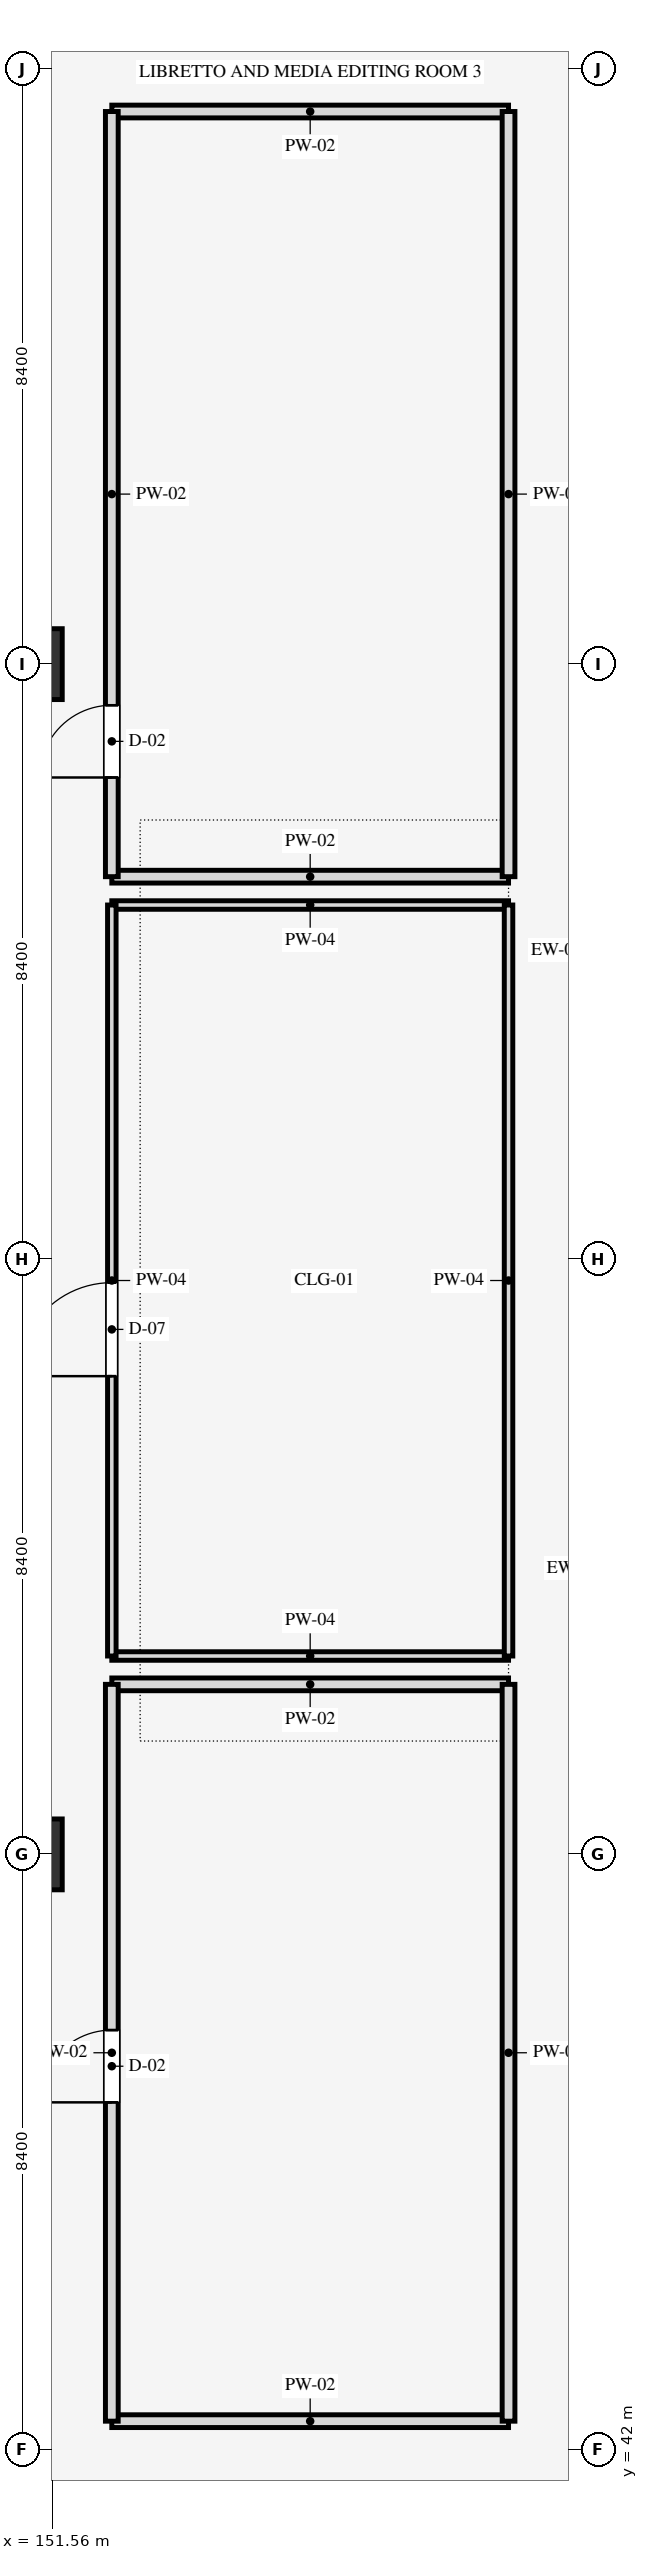
"""IFC4 building model, lengths in metres.
Left out: names, types, materials, properties, quantities, classifications, styles, units other than length and angle.
Written with IfcOpenShell. Run it as: python <this file> out.ifc"""

import sys

from ifc_helpers import new_model, si_unit, direction, frame, frame_2d, origin, origin_2d, place, context, subcontext, project, spatial, rectangle, extrude, element, fill, save


model = new_model("IFC4")
c1 = context("Model", 3, precision=1e-05, world=origin(), true_north=direction((0.0, 1.0)))
c2 = subcontext(c1, "Body", "Model", "MODEL_VIEW")
j1 = project(units=[si_unit("LENGTHUNIT", "METRE"), si_unit("PLANEANGLEUNIT", "RADIAN")], contexts=[c1])
p1 = place(None, origin())
s1 = spatial("IfcSite", under=j1, at=p1, CompositionType="ELEMENT")
p2 = place(p1, origin())
s2 = spatial("IfcBuilding", under=s1, at=p2, CompositionType="ELEMENT")
p3 = place(p2, frame((0.0, 0.0, 44.7)))
s3 = spatial("IfcBuildingStorey", under=s2, at=p3, CompositionType="ELEMENT", Elevation=44.7)
for number, where, z_axis, x_axis in (
    (1, (151.2, 50.4, 0.0), (0.0, 0.0, 1.0), (1.0, 0.0, 0.0)),
    (2, (151.2, 67.2, 0.0), (0.0, 0.0, 1.0), (1.0, 0.0, 0.0)),
):
    element("IfcColumn", number, at=place(p3, frame(where, z_axis=z_axis, x_axis=x_axis)), inside=s3, PredefinedType="COLUMN", context=c2, shape_type="SweptSolid", body=[
        extrude(rectangle(XDim=1.0, YDim=1.0, at=origin_2d()), origin(), (0.0, 0.0, 1.0), 4.2),
    ])
for number, where, z_axis, x_axis in (
    (3, (152.4, 42.4, 0.0), (0.0, 0.0, 1.0), (1.0, 0.0, 0.0)),
    (4, (152.4, 52.8, 0.0), (0.0, 0.0, 1.0), (1.0, 0.0, 0.0)),
):
    element("IfcWall", number, at=place(p3, frame(where, z_axis=z_axis, x_axis=x_axis)), inside=s3, PredefinedType="PARTITIONING", context=c2, shape_type="SweptSolid", body=[
        extrude(rectangle(XDim=5.6, YDim=0.18, at=frame_2d((2.8, 0.0))), origin(), (0.0, 0.0, 1.0), 3.24),
    ])
p4 = place(p3, frame((152.4, 42.4, 0.0), z_axis=(0.0, 0.0, 1.0), x_axis=(0.0, 1.0, 0.0)))
e5 = element("IfcWall", 5, at=p4, inside=s3, PredefinedType="PARTITIONING", context=c2, shape_type="SweptSolid", body=[
    extrude(rectangle(XDim=10.4, YDim=0.18, at=frame_2d((5.2, 0.0))), origin(), (0.0, 0.0, 1.0), 3.24),
])
p5 = place(p4, frame((4.5, 0.0, 0.0)))
e6 = element("IfcOpeningElement", 6, at=p5, cuts=e5, PredefinedType="OPENING", context=c2, shape_type="SweptSolid", body=[
    extrude(rectangle(XDim=1.02, YDim=2.1, at=frame_2d((0.51, 1.05))), frame((0.0, 0.1, 0.0), z_axis=(0.0, -1.0, 0.0), x_axis=(1.0, 0.0, 0.0)), (0.0, 0.0, 1.0), 0.2),
])
p6 = place(p3, frame((158.0, 42.4, 0.0), z_axis=(0.0, 0.0, 1.0), x_axis=(0.0, 1.0, 0.0)))
e7 = element("IfcWall", 7, at=p6, inside=s3, PredefinedType="PARTITIONING", context=c2, shape_type="SweptSolid", body=[
    extrude(rectangle(XDim=10.4, YDim=0.18, at=frame_2d((5.2, 0.0))), origin(), (0.0, 0.0, 1.0), 3.24),
])
for number, where, z_axis, x_axis in (
    (8, (152.4, 53.2, 0.0), (0.0, 0.0, 1.0), (1.0, 0.0, 0.0)),
    (9, (152.4, 63.8, 0.0), (0.0, 0.0, 1.0), (1.0, 0.0, 0.0)),
):
    element("IfcWall", number, at=place(p3, frame(where, z_axis=z_axis, x_axis=x_axis)), inside=s3, PredefinedType="PARTITIONING", context=c2, shape_type="SweptSolid", body=[
        extrude(rectangle(XDim=5.6, YDim=0.12, at=frame_2d((2.8, 0.0))), origin(), (0.0, 0.0, 1.0), 3.24),
    ])
p7 = place(p3, frame((152.4, 53.2, 0.0), z_axis=(0.0, 0.0, 1.0), x_axis=(0.0, 1.0, 0.0)))
e10 = element("IfcWall", 10, at=p7, inside=s3, PredefinedType="PARTITIONING", context=c2, shape_type="SweptSolid", body=[
    extrude(rectangle(XDim=10.6, YDim=0.12, at=frame_2d((5.3, 0.0))), origin(), (0.0, 0.0, 1.0), 3.24),
])
p8 = place(p7, frame((3.95, 0.0, 0.0)))
e11 = element("IfcOpeningElement", 11, at=p8, cuts=e10, PredefinedType="OPENING", context=c2, shape_type="SweptSolid", body=[
    extrude(rectangle(XDim=1.32, YDim=2.18, at=frame_2d((0.66, 1.09))), frame((0.0, 0.07, 0.0), z_axis=(0.0, -1.0, 0.0), x_axis=(1.0, 0.0, 0.0)), (0.0, 0.0, 1.0), 0.14),
])
p9 = place(p3, frame((158.0, 53.2, 0.0), z_axis=(0.0, 0.0, 1.0), x_axis=(0.0, 1.0, 0.0)))
e12 = element("IfcWall", 12, at=p9, inside=s3, PredefinedType="PARTITIONING", context=c2, shape_type="SweptSolid", body=[
    extrude(rectangle(XDim=10.6, YDim=0.12, at=frame_2d((5.3, 0.0))), origin(), (0.0, 0.0, 1.0), 3.24),
])
for number, where, z_axis, x_axis in (
    (13, (152.4, 64.2, 0.0), (0.0, 0.0, 1.0), (1.0, 0.0, 0.0)),
    (14, (152.4, 75.0, 0.0), (0.0, 0.0, 1.0), (1.0, 0.0, 0.0)),
):
    element("IfcWall", number, at=place(p3, frame(where, z_axis=z_axis, x_axis=x_axis)), inside=s3, PredefinedType="PARTITIONING", context=c2, shape_type="SweptSolid", body=[
        extrude(rectangle(XDim=5.6, YDim=0.18, at=frame_2d((2.8, 0.0))), origin(), (0.0, 0.0, 1.0), 3.24),
    ])
p10 = place(p3, frame((152.4, 64.2, 0.0), z_axis=(0.0, 0.0, 1.0), x_axis=(0.0, 1.0, 0.0)))
e15 = element("IfcWall", 15, at=p10, inside=s3, PredefinedType="PARTITIONING", context=c2, shape_type="SweptSolid", body=[
    extrude(rectangle(XDim=10.8, YDim=0.18, at=frame_2d((5.4, 0.0))), origin(), (0.0, 0.0, 1.0), 3.24),
])
p11 = place(p10, frame((1.4, 0.0, 0.0)))
e16 = element("IfcOpeningElement", 16, at=p11, cuts=e15, PredefinedType="OPENING", context=c2, shape_type="SweptSolid", body=[
    extrude(rectangle(XDim=1.02, YDim=2.1, at=frame_2d((0.51, 1.05))), frame((0.0, 0.1, 0.0), z_axis=(0.0, -1.0, 0.0), x_axis=(1.0, 0.0, 0.0)), (0.0, 0.0, 1.0), 0.2),
])
p12 = place(p3, frame((158.0, 64.2, 0.0), z_axis=(0.0, 0.0, 1.0), x_axis=(0.0, 1.0, 0.0)))
e17 = element("IfcWall", 17, at=p12, inside=s3, PredefinedType="PARTITIONING", context=c2, shape_type="SweptSolid", body=[
    extrude(rectangle(XDim=10.8, YDim=0.18, at=frame_2d((5.4, 0.0))), origin(), (0.0, 0.0, 1.0), 3.24),
])
p13 = place(p5, origin())
e18 = element("IfcDoor", 18, at=p13, inside=s3, OperationType="SINGLE_SWING_LEFT", PredefinedType="DOOR", context=c2, shape_type="SweptSolid", body=[
    extrude(rectangle(XDim=1.02, YDim=2.1, at=frame_2d((0.51, 1.05))), frame((0.0, 0.025, 0.0), z_axis=(0.0, -1.0, 0.0), x_axis=(1.0, 0.0, 0.0)), (0.0, 0.0, 1.0), 0.05),
])
fill(e6, e18)
p14 = place(p8, origin())
e19 = element("IfcDoor", 19, at=p14, inside=s3, OperationType="SINGLE_SWING_LEFT", PredefinedType="DOOR", context=c2, shape_type="SweptSolid", body=[
    extrude(rectangle(XDim=1.32, YDim=2.18, at=frame_2d((0.66, 1.09))), frame((0.0, 0.025, 0.0), z_axis=(0.0, -1.0, 0.0), x_axis=(1.0, 0.0, 0.0)), (0.0, 0.0, 1.0), 0.05),
])
fill(e11, e19)
p15 = place(p11, origin())
e20 = element("IfcDoor", 20, at=p15, inside=s3, OperationType="SINGLE_SWING_LEFT", PredefinedType="DOOR", context=c2, shape_type="SweptSolid", body=[
    extrude(rectangle(XDim=1.02, YDim=2.1, at=frame_2d((0.51, 1.05))), frame((0.0, 0.025, 0.0), z_axis=(0.0, -1.0, 0.0), x_axis=(1.0, 0.0, 0.0)), (0.0, 0.0, 1.0), 0.05),
])
fill(e16, e20)
save(model, sys.argv[1])
